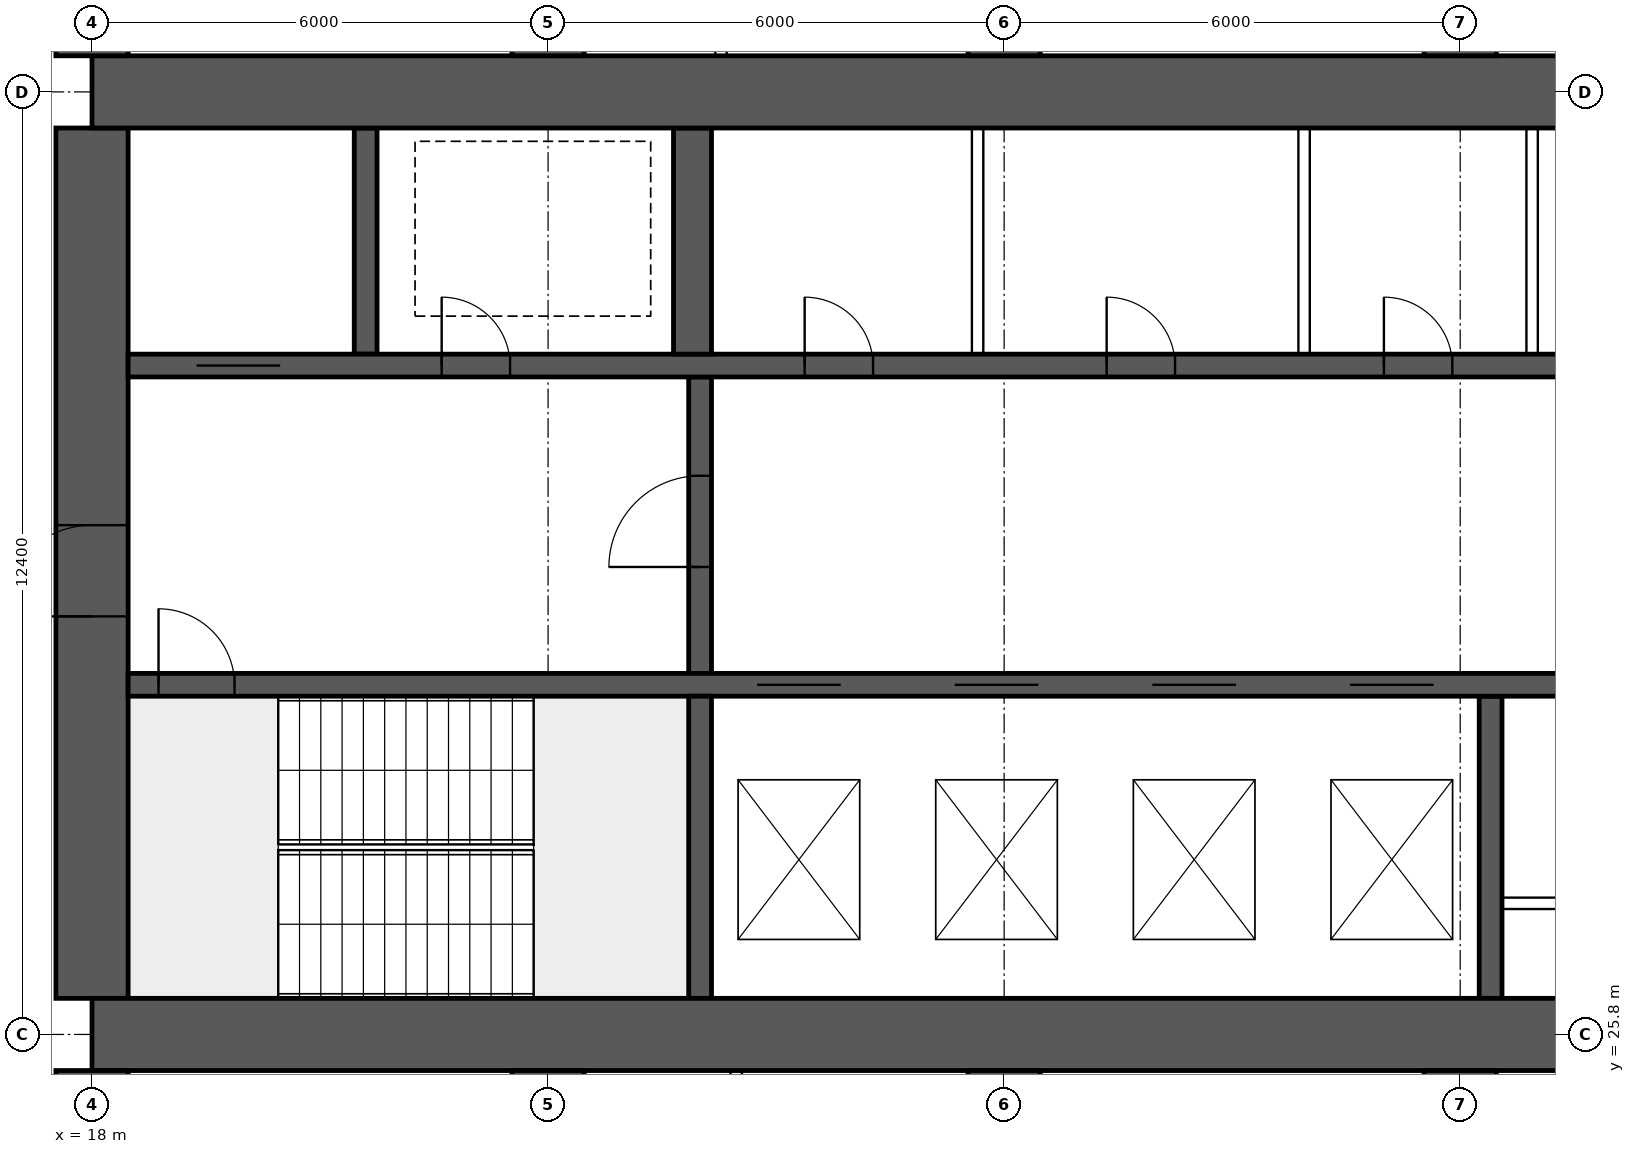
"""IFC4 building model, lengths in metres.
Left out: names, types, materials, properties, quantities, classifications, styles, units other than length and angle.
Written with IfcOpenShell. Run it as: python <this file> out.ifc"""

import sys

from ifc_helpers import new_model, si_unit, direction, frame, frame_2d, origin, place, context, subcontext, project, spatial, rectangle, extrude, element, fill, save


model = new_model("IFC4")
c1 = context("Model", 3, precision=1e-05, world=origin(), true_north=direction((0.0, 1.0)))
c2 = subcontext(c1, "Body", "Model", "MODEL_VIEW")
j1 = project(units=[si_unit("LENGTHUNIT", "METRE"), si_unit("PLANEANGLEUNIT", "RADIAN")], contexts=[c1])
p1 = place(None, origin())
s1 = spatial("IfcSite", under=j1, at=p1, CompositionType="ELEMENT")
p2 = place(p1, origin())
s2 = spatial("IfcBuilding", under=s1, at=p2, CompositionType="ELEMENT")
p3 = place(p2, frame((0.0, 0.0, 140.35)))
s3 = spatial("IfcBuildingStorey", under=s2, at=p3, CompositionType="ELEMENT", Elevation=140.35)
for number, where, z_axis, x_axis in (
    (1, (18.0, 25.8, 0.0), (0.0, 0.0, 1.0), (1.0, 0.0, 0.0)),
    (2, (18.0, 38.2, 0.0), (0.0, 0.0, 1.0), (1.0, 0.0, 0.0)),
):
    element("IfcWall", number, at=place(p3, frame(where, z_axis=z_axis, x_axis=x_axis)), inside=s3, PredefinedType="SHEAR", context=c2, shape_type="SweptSolid", body=[
        extrude(rectangle(XDim=48.0, YDim=0.95, at=frame_2d((24.0, 0.0))), origin(), (0.0, 0.0, 1.0), 4.5),
    ])
p4 = place(p3, frame((18.0, 26.275, 0.0), z_axis=(0.0, 0.0, 1.0), x_axis=(0.0, 1.0, 0.0)))
e3 = element("IfcWall", 3, at=p4, inside=s3, PredefinedType="SHEAR", context=c2, shape_type="SweptSolid", body=[
    extrude(rectangle(XDim=11.45, YDim=0.95, at=frame_2d((5.725, 0.0))), origin(), (0.0, 0.0, 1.0), 4.5),
])
p5 = place(p4, frame((5.025, 0.0, 0.0)))
e4 = element("IfcOpeningElement", 4, at=p5, cuts=e3, PredefinedType="OPENING", context=c2, shape_type="SweptSolid", body=[
    extrude(rectangle(XDim=1.2, YDim=2.1, at=frame_2d((0.6, 1.05))), frame((0.0, 0.485, 0.0), z_axis=(0.0, -1.0, 0.0), x_axis=(1.0, 0.0, 0.0)), (0.0, 0.0, 1.0), 0.97),
])
p6 = place(p3, frame((18.475, 30.4, 0.0), z_axis=(0.0, 0.0, 1.0), x_axis=(1.0, 0.0, 0.0)))
e5 = element("IfcWall", 5, at=p6, inside=s3, PredefinedType="SHEAR", context=c2, shape_type="SweptSolid", body=[
    extrude(rectangle(XDim=47.05, YDim=0.3, at=frame_2d((23.525, 0.0))), origin(), (0.0, 0.0, 1.0), 4.5),
])
p7 = place(p6, frame((0.4, 0.0, 0.0)))
e6 = element("IfcOpeningElement", 6, at=p7, cuts=e5, PredefinedType="OPENING", context=c2, shape_type="SweptSolid", body=[
    extrude(rectangle(XDim=1.0, YDim=2.1, at=frame_2d((0.5, 1.05))), frame((0.0, 0.16, 0.0), z_axis=(0.0, -1.0, 0.0), x_axis=(1.0, 0.0, 0.0)), (0.0, 0.0, 1.0), 0.32),
])
p8 = place(p6, frame((45.65, 0.0, 0.0)))
e7 = element("IfcOpeningElement", 7, at=p8, cuts=e5, PredefinedType="OPENING", context=c2, shape_type="SweptSolid", body=[
    extrude(rectangle(XDim=1.0, YDim=2.1, at=frame_2d((0.5, 1.05))), frame((0.0, 0.16, 0.0), z_axis=(0.0, -1.0, 0.0), x_axis=(1.0, 0.0, 0.0)), (0.0, 0.0, 1.0), 0.32),
])
p9 = place(p6, frame((8.275, 0.0, 0.0)))
e8 = element("IfcOpeningElement", 8, at=p9, cuts=e5, PredefinedType="OPENING", context=c2, shape_type="SweptSolid", body=[
    extrude(rectangle(XDim=1.1, YDim=2.1, at=frame_2d((0.55, 1.05))), frame((0.0, 0.16, 0.0), z_axis=(0.0, -1.0, 0.0), x_axis=(1.0, 0.0, 0.0)), (0.0, 0.0, 1.0), 0.32),
])
p10 = place(p6, frame((10.875, 0.0, 0.0)))
e9 = element("IfcOpeningElement", 9, at=p10, cuts=e5, PredefinedType="OPENING", context=c2, shape_type="SweptSolid", body=[
    extrude(rectangle(XDim=1.1, YDim=2.1, at=frame_2d((0.55, 1.05))), frame((0.0, 0.16, 0.0), z_axis=(0.0, -1.0, 0.0), x_axis=(1.0, 0.0, 0.0)), (0.0, 0.0, 1.0), 0.32),
])
p11 = place(p6, frame((13.475, 0.0, 0.0)))
e10 = element("IfcOpeningElement", 10, at=p11, cuts=e5, PredefinedType="OPENING", context=c2, shape_type="SweptSolid", body=[
    extrude(rectangle(XDim=1.1, YDim=2.1, at=frame_2d((0.55, 1.05))), frame((0.0, 0.16, 0.0), z_axis=(0.0, -1.0, 0.0), x_axis=(1.0, 0.0, 0.0)), (0.0, 0.0, 1.0), 0.32),
])
p12 = place(p6, frame((16.075, 0.0, 0.0)))
e11 = element("IfcOpeningElement", 11, at=p12, cuts=e5, PredefinedType="OPENING", context=c2, shape_type="SweptSolid", body=[
    extrude(rectangle(XDim=1.1, YDim=2.1, at=frame_2d((0.55, 1.05))), frame((0.0, 0.16, 0.0), z_axis=(0.0, -1.0, 0.0), x_axis=(1.0, 0.0, 0.0)), (0.0, 0.0, 1.0), 0.32),
])
p13 = place(p6, frame((18.85, 0.0, 0.0)))
e12 = element("IfcOpeningElement", 12, at=p13, cuts=e5, PredefinedType="OPENING", context=c2, shape_type="SweptSolid", body=[
    extrude(rectangle(XDim=0.9, YDim=2.1, at=frame_2d((0.45, 1.05))), frame((0.0, 0.16, 0.0), z_axis=(0.0, -1.0, 0.0), x_axis=(1.0, 0.0, 0.0)), (0.0, 0.0, 1.0), 0.32),
])
p14 = place(p6, frame((21.5, 0.0, 0.0)))
e13 = element("IfcOpeningElement", 13, at=p14, cuts=e5, PredefinedType="OPENING", context=c2, shape_type="SweptSolid", body=[
    extrude(rectangle(XDim=1.1, YDim=2.1, at=frame_2d((0.55, 1.05))), frame((0.0, 0.16, 0.0), z_axis=(0.0, -1.0, 0.0), x_axis=(1.0, 0.0, 0.0)), (0.0, 0.0, 1.0), 0.32),
])
p15 = place(p6, frame((30.142, 0.0, 0.0)))
e14 = element("IfcOpeningElement", 14, at=p15, cuts=e5, PredefinedType="OPENING", context=c2, shape_type="SweptSolid", body=[
    extrude(rectangle(XDim=1.1, YDim=2.1, at=frame_2d((0.55, 1.05))), frame((0.0, 0.16, 0.0), z_axis=(0.0, -1.0, 0.0), x_axis=(1.0, 0.0, 0.0)), (0.0, 0.0, 1.0), 0.32),
])
p16 = place(p6, frame((33.675, 0.0, 0.0)))
e15 = element("IfcOpeningElement", 15, at=p16, cuts=e5, PredefinedType="OPENING", context=c2, shape_type="SweptSolid", body=[
    extrude(rectangle(XDim=1.1, YDim=2.1, at=frame_2d((0.55, 1.05))), frame((0.0, 0.16, 0.0), z_axis=(0.0, -1.0, 0.0), x_axis=(1.0, 0.0, 0.0)), (0.0, 0.0, 1.0), 0.32),
])
p17 = place(p6, frame((37.208, 0.0, 0.0)))
e16 = element("IfcOpeningElement", 16, at=p17, cuts=e5, PredefinedType="OPENING", context=c2, shape_type="SweptSolid", body=[
    extrude(rectangle(XDim=1.1, YDim=2.1, at=frame_2d((0.55, 1.05))), frame((0.0, 0.16, 0.0), z_axis=(0.0, -1.0, 0.0), x_axis=(1.0, 0.0, 0.0)), (0.0, 0.0, 1.0), 0.32),
])
p18 = place(p3, frame((18.475, 34.6, 0.0), z_axis=(0.0, 0.0, 1.0), x_axis=(1.0, 0.0, 0.0)))
e17 = element("IfcWall", 17, at=p18, inside=s3, PredefinedType="SHEAR", context=c2, shape_type="SweptSolid", body=[
    extrude(rectangle(XDim=47.05, YDim=0.3, at=frame_2d((23.525, 0.0))), origin(), (0.0, 0.0, 1.0), 4.5),
])
p19 = place(p18, frame((0.9, 0.0, 0.0)))
e18 = element("IfcOpeningElement", 18, at=p19, cuts=e17, PredefinedType="OPENING", context=c2, shape_type="SweptSolid", body=[
    extrude(rectangle(XDim=1.1, YDim=2.1, at=frame_2d((0.55, 1.05))), frame((0.0, 0.16, 0.0), z_axis=(0.0, -1.0, 0.0), x_axis=(1.0, 0.0, 0.0)), (0.0, 0.0, 1.0), 0.32),
])
p20 = place(p18, frame((45.05, 0.0, 0.0)))
e19 = element("IfcOpeningElement", 19, at=p20, cuts=e17, PredefinedType="OPENING", context=c2, shape_type="SweptSolid", body=[
    extrude(rectangle(XDim=1.1, YDim=2.1, at=frame_2d((0.55, 1.05))), frame((0.0, 0.16, 0.0), z_axis=(0.0, -1.0, 0.0), x_axis=(1.0, 0.0, 0.0)), (0.0, 0.0, 1.0), 0.32),
])
p21 = place(p18, frame((4.125, 0.0, 0.0)))
e20 = element("IfcOpeningElement", 20, at=p21, cuts=e17, PredefinedType="OPENING", context=c2, shape_type="SweptSolid", body=[
    extrude(rectangle(XDim=0.9, YDim=2.1, at=frame_2d((0.45, 1.05))), frame((0.0, 0.16, 0.0), z_axis=(0.0, -1.0, 0.0), x_axis=(1.0, 0.0, 0.0)), (0.0, 0.0, 1.0), 0.32),
])
p22 = place(p18, frame((42.025, 0.0, 0.0)))
e21 = element("IfcOpeningElement", 21, at=p22, cuts=e17, PredefinedType="OPENING", context=c2, shape_type="SweptSolid", body=[
    extrude(rectangle(XDim=0.9, YDim=2.1, at=frame_2d((0.45, 1.05))), frame((0.0, 0.16, 0.0), z_axis=(0.0, -1.0, 0.0), x_axis=(1.0, 0.0, 0.0)), (0.0, 0.0, 1.0), 0.32),
])
p23 = place(p18, frame((8.9, 0.0, 0.0)))
e22 = element("IfcOpeningElement", 22, at=p23, cuts=e17, PredefinedType="OPENING", context=c2, shape_type="SweptSolid", body=[
    extrude(rectangle(XDim=0.9, YDim=2.1, at=frame_2d((0.45, 1.05))), frame((0.0, 0.16, 0.0), z_axis=(0.0, -1.0, 0.0), x_axis=(1.0, 0.0, 0.0)), (0.0, 0.0, 1.0), 0.32),
])
p24 = place(p18, frame((12.874, 0.0, 0.0)))
e23 = element("IfcOpeningElement", 23, at=p24, cuts=e17, PredefinedType="OPENING", context=c2, shape_type="SweptSolid", body=[
    extrude(rectangle(XDim=0.9, YDim=2.1, at=frame_2d((0.45, 1.05))), frame((0.0, 0.16, 0.0), z_axis=(0.0, -1.0, 0.0), x_axis=(1.0, 0.0, 0.0)), (0.0, 0.0, 1.0), 0.32),
])
p25 = place(p18, frame((16.521, 0.0, 0.0)))
e24 = element("IfcOpeningElement", 24, at=p25, cuts=e17, PredefinedType="OPENING", context=c2, shape_type="SweptSolid", body=[
    extrude(rectangle(XDim=0.9, YDim=2.1, at=frame_2d((0.45, 1.05))), frame((0.0, 0.16, 0.0), z_axis=(0.0, -1.0, 0.0), x_axis=(1.0, 0.0, 0.0)), (0.0, 0.0, 1.0), 0.32),
])
p26 = place(p18, frame((20.28, 0.0, 0.0)))
e25 = element("IfcOpeningElement", 25, at=p26, cuts=e17, PredefinedType="OPENING", context=c2, shape_type="SweptSolid", body=[
    extrude(rectangle(XDim=0.9, YDim=2.1, at=frame_2d((0.45, 1.05))), frame((0.0, 0.16, 0.0), z_axis=(0.0, -1.0, 0.0), x_axis=(1.0, 0.0, 0.0)), (0.0, 0.0, 1.0), 0.32),
])
p27 = place(p18, frame((24.686, 0.0, 0.0)))
e26 = element("IfcOpeningElement", 26, at=p27, cuts=e17, PredefinedType="OPENING", context=c2, shape_type="SweptSolid", body=[
    extrude(rectangle(XDim=0.9, YDim=2.1, at=frame_2d((0.45, 1.05))), frame((0.0, 0.16, 0.0), z_axis=(0.0, -1.0, 0.0), x_axis=(1.0, 0.0, 0.0)), (0.0, 0.0, 1.0), 0.32),
])
p28 = place(p18, frame((27.483, 0.0, 0.0)))
e27 = element("IfcOpeningElement", 27, at=p28, cuts=e17, PredefinedType="OPENING", context=c2, shape_type="SweptSolid", body=[
    extrude(rectangle(XDim=0.9, YDim=2.1, at=frame_2d((0.45, 1.05))), frame((0.0, 0.16, 0.0), z_axis=(0.0, -1.0, 0.0), x_axis=(1.0, 0.0, 0.0)), (0.0, 0.0, 1.0), 0.32),
])
p29 = place(p18, frame((30.666, 0.0, 0.0)))
e28 = element("IfcOpeningElement", 28, at=p29, cuts=e17, PredefinedType="OPENING", context=c2, shape_type="SweptSolid", body=[
    extrude(rectangle(XDim=0.9, YDim=2.1, at=frame_2d((0.45, 1.05))), frame((0.0, 0.16, 0.0), z_axis=(0.0, -1.0, 0.0), x_axis=(1.0, 0.0, 0.0)), (0.0, 0.0, 1.0), 0.32),
])
p30 = place(p18, frame((34.617, 0.0, 0.0)))
e29 = element("IfcOpeningElement", 29, at=p30, cuts=e17, PredefinedType="OPENING", context=c2, shape_type="SweptSolid", body=[
    extrude(rectangle(XDim=0.9, YDim=2.1, at=frame_2d((0.45, 1.05))), frame((0.0, 0.16, 0.0), z_axis=(0.0, -1.0, 0.0), x_axis=(1.0, 0.0, 0.0)), (0.0, 0.0, 1.0), 0.32),
])
p31 = place(p18, frame((37.555, 0.0, 0.0)))
e30 = element("IfcOpeningElement", 30, at=p31, cuts=e17, PredefinedType="OPENING", context=c2, shape_type="SweptSolid", body=[
    extrude(rectangle(XDim=0.9, YDim=2.1, at=frame_2d((0.45, 1.05))), frame((0.0, 0.16, 0.0), z_axis=(0.0, -1.0, 0.0), x_axis=(1.0, 0.0, 0.0)), (0.0, 0.0, 1.0), 0.32),
])
p32 = place(p3, frame((26.0, 26.275, 0.0), z_axis=(0.0, 0.0, 1.0), x_axis=(0.0, 1.0, 0.0)))
e31 = element("IfcWall", 31, at=p32, inside=s3, PredefinedType="SHEAR", context=c2, shape_type="SweptSolid", body=[
    extrude(rectangle(XDim=3.975, YDim=0.3, at=frame_2d((1.988, 0.0))), origin(), (0.0, 0.0, 1.0), 4.5),
])
p33 = place(p3, frame((26.0, 30.55, 0.0), z_axis=(0.0, 0.0, 1.0), x_axis=(0.0, 1.0, 0.0)))
e32 = element("IfcWall", 32, at=p33, inside=s3, PredefinedType="SHEAR", context=c2, shape_type="SweptSolid", body=[
    extrude(rectangle(XDim=3.9, YDim=0.3, at=frame_2d((1.95, 0.0))), origin(), (0.0, 0.0, 1.0), 4.5),
])
p34 = place(p33, frame((1.4, 0.0, 0.0)))
e33 = element("IfcOpeningElement", 33, at=p34, cuts=e32, PredefinedType="OPENING", context=c2, shape_type="SweptSolid", body=[
    extrude(rectangle(XDim=1.2, YDim=2.1, at=frame_2d((0.6, 1.05))), frame((0.0, 0.16, 0.0), z_axis=(0.0, -1.0, 0.0), x_axis=(1.0, 0.0, 0.0)), (0.0, 0.0, 1.0), 0.32),
])
p35 = place(p3, frame((21.6, 34.75, 0.0), z_axis=(0.0, 0.0, 1.0), x_axis=(0.0, 1.0, 0.0)))
e34 = element("IfcWall", 34, at=p35, inside=s3, PredefinedType="SHEAR", context=c2, shape_type="SweptSolid", body=[
    extrude(rectangle(XDim=2.975, YDim=0.3, at=frame_2d((1.488, 0.0))), origin(), (0.0, 0.0, 1.0), 4.5),
])
p36 = place(p3, frame((25.9, 34.75, 0.0), z_axis=(0.0, 0.0, 1.0), x_axis=(0.0, 1.0, 0.0)))
e35 = element("IfcWall", 35, at=p36, inside=s3, PredefinedType="SHEAR", context=c2, shape_type="SweptSolid", body=[
    extrude(rectangle(XDim=2.975, YDim=0.5, at=frame_2d((1.488, 0.0))), origin(), (0.0, 0.0, 1.0), 4.5),
])
p37 = place(p3, frame((36.4, 26.275, 0.0), z_axis=(0.0, 0.0, 1.0), x_axis=(0.0, 1.0, 0.0)))
e36 = element("IfcWall", 36, at=p37, inside=s3, PredefinedType="SHEAR", context=c2, shape_type="SweptSolid", body=[
    extrude(rectangle(XDim=3.975, YDim=0.3, at=frame_2d((1.988, 0.0))), origin(), (0.0, 0.0, 1.0), 4.5),
])
for number, where, z_axis, x_axis in (
    (37, (18.0, 17.2, 0.0), (0.0, 0.0, 1.0), (0.0, 1.0, 0.0)),
    (38, (18.0, 38.675, 0.0), (0.0, 0.0, 1.0), (0.0, 1.0, 0.0)),
    (39, (24.0, 17.2, 0.0), (0.0, 0.0, 1.0), (0.0, 1.0, 0.0)),
    (40, (24.0, 38.675, 0.0), (0.0, 0.0, 1.0), (0.0, 1.0, 0.0)),
    (41, (30.0, 17.2, 0.0), (0.0, 0.0, 1.0), (0.0, 1.0, 0.0)),
    (42, (30.0, 38.675, 0.0), (0.0, 0.0, 1.0), (0.0, 1.0, 0.0)),
    (43, (36.0, 17.2, 0.0), (0.0, 0.0, 1.0), (0.0, 1.0, 0.0)),
    (44, (36.0, 38.675, 0.0), (0.0, 0.0, 1.0), (0.0, 1.0, 0.0)),
):
    element("IfcWall", number, at=place(p3, frame(where, z_axis=z_axis, x_axis=x_axis)), inside=s3, PredefinedType="SHEAR", context=c2, shape_type="SweptSolid", body=[
        extrude(rectangle(XDim=8.125, YDim=0.95, at=frame_2d((4.062, 0.0))), origin(), (0.0, 0.0, 1.0), 4.5),
    ])
for number, where, z_axis, x_axis in (
    (45, (29.651, 34.75, 0.0), (0.0, 0.0, 1.0), (0.0, 1.0, 0.0)),
    (46, (33.946, 34.75, 0.0), (0.0, 0.0, 1.0), (0.0, 1.0, 0.0)),
    (47, (36.946, 34.75, 0.0), (0.0, 0.0, 1.0), (0.0, 1.0, 0.0)),
):
    element("IfcWall", number, at=place(p3, frame(where, z_axis=z_axis, x_axis=x_axis)), inside=s3, PredefinedType="SOLIDWALL", context=c2, shape_type="SweptSolid", body=[
        extrude(rectangle(XDim=2.975, YDim=0.15, at=frame_2d((1.488, 0.0))), origin(), (0.0, 0.0, 1.0), 4.25),
    ])
p38 = place(p3, frame((36.55, 27.525, 0.0), z_axis=(0.0, 0.0, 1.0), x_axis=(1.0, 0.0, 0.0)))
e48 = element("IfcWall", 48, at=p38, inside=s3, PredefinedType="SOLIDWALL", context=c2, shape_type="SweptSolid", body=[
    extrude(rectangle(XDim=2.5, YDim=0.15, at=frame_2d((1.25, 0.0))), origin(), (0.0, 0.0, 1.0), 4.25),
])
p39 = place(p38, frame((0.8, 0.0, 0.0)))
e49 = element("IfcOpeningElement", 49, at=p39, cuts=e48, PredefinedType="OPENING", context=c2, shape_type="SweptSolid", body=[
    extrude(rectangle(XDim=0.9, YDim=2.1, at=frame_2d((0.45, 1.05))), frame((0.0, 0.085, 0.0), z_axis=(0.0, -1.0, 0.0), x_axis=(1.0, 0.0, 0.0)), (0.0, 0.0, 1.0), 0.17),
])
for number, where, z_axis, x_axis in (
    (50, (26.475, 17.3, 0.0), (0.0, 0.0, 1.0), (0.0, 1.0, 0.0)),
    (51, (26.275, 38.675, 0.0), (0.0, 0.0, 1.0), (0.0, 1.0, 0.0)),
):
    element("IfcWall", number, at=place(p3, frame(where, z_axis=z_axis, x_axis=x_axis)), inside=s3, PredefinedType="PARTITIONING", context=c2, shape_type="SweptSolid", body=[
        extrude(rectangle(XDim=8.025, YDim=0.15, at=frame_2d((4.012, 0.0))), origin(), (0.0, 0.0, 1.0), 4.25),
    ])
p40 = place(p5, origin())
e52 = element("IfcDoor", 52, at=p40, inside=s3, OperationType="SINGLE_SWING_LEFT", PredefinedType="DOOR", context=c2, shape_type="SweptSolid", body=[
    extrude(rectangle(XDim=1.2, YDim=2.1, at=frame_2d((0.6, 1.05))), frame((0.0, 0.025, 0.0), z_axis=(0.0, -1.0, 0.0), x_axis=(1.0, 0.0, 0.0)), (0.0, 0.0, 1.0), 0.05),
])
fill(e4, e52)
p41 = place(p7, origin())
e53 = element("IfcDoor", 53, at=p41, inside=s3, OperationType="SINGLE_SWING_LEFT", PredefinedType="DOOR", context=c2, shape_type="SweptSolid", body=[
    extrude(rectangle(XDim=1.0, YDim=2.1, at=frame_2d((0.5, 1.05))), frame((0.0, 0.025, 0.0), z_axis=(0.0, -1.0, 0.0), x_axis=(1.0, 0.0, 0.0)), (0.0, 0.0, 1.0), 0.05),
])
fill(e6, e53)
p42 = place(p19, origin())
e54 = element("IfcDoor", 54, at=p42, inside=s3, OperationType="DOUBLE_DOOR_SLIDING", PredefinedType="DOOR", context=c2, shape_type="SweptSolid", body=[
    extrude(rectangle(XDim=1.1, YDim=2.1, at=frame_2d((0.55, 1.05))), frame((0.0, 0.025, 0.0), z_axis=(0.0, -1.0, 0.0), x_axis=(1.0, 0.0, 0.0)), (0.0, 0.0, 1.0), 0.05),
])
fill(e18, e54)
p43 = place(p21, origin())
e55 = element("IfcDoor", 55, at=p43, inside=s3, OperationType="SINGLE_SWING_LEFT", PredefinedType="DOOR", context=c2, shape_type="SweptSolid", body=[
    extrude(rectangle(XDim=0.9, YDim=2.1, at=frame_2d((0.45, 1.05))), frame((0.0, 0.025, 0.0), z_axis=(0.0, -1.0, 0.0), x_axis=(1.0, 0.0, 0.0)), (0.0, 0.0, 1.0), 0.05),
])
fill(e20, e55)
p44 = place(p34, origin())
e56 = element("IfcDoor", 56, at=p44, inside=s3, OperationType="SINGLE_SWING_LEFT", PredefinedType="DOOR", context=c2, shape_type="SweptSolid", body=[
    extrude(rectangle(XDim=1.2, YDim=2.1, at=frame_2d((0.6, 1.05))), frame((0.0, 0.025, 0.0), z_axis=(0.0, -1.0, 0.0), x_axis=(1.0, 0.0, 0.0)), (0.0, 0.0, 1.0), 0.05),
])
fill(e33, e56)
p45 = place(p23, origin())
e57 = element("IfcDoor", 57, at=p45, inside=s3, OperationType="SINGLE_SWING_LEFT", PredefinedType="DOOR", context=c2, shape_type="SweptSolid", body=[
    extrude(rectangle(XDim=0.9, YDim=2.1, at=frame_2d((0.45, 1.05))), frame((0.0, 0.025, 0.0), z_axis=(0.0, -1.0, 0.0), x_axis=(1.0, 0.0, 0.0)), (0.0, 0.0, 1.0), 0.05),
])
fill(e22, e57)
p46 = place(p24, origin())
e58 = element("IfcDoor", 58, at=p46, inside=s3, OperationType="SINGLE_SWING_LEFT", PredefinedType="DOOR", context=c2, shape_type="SweptSolid", body=[
    extrude(rectangle(XDim=0.9, YDim=2.1, at=frame_2d((0.45, 1.05))), frame((0.0, 0.025, 0.0), z_axis=(0.0, -1.0, 0.0), x_axis=(1.0, 0.0, 0.0)), (0.0, 0.0, 1.0), 0.05),
])
fill(e23, e58)
p47 = place(p25, origin())
e59 = element("IfcDoor", 59, at=p47, inside=s3, OperationType="SINGLE_SWING_LEFT", PredefinedType="DOOR", context=c2, shape_type="SweptSolid", body=[
    extrude(rectangle(XDim=0.9, YDim=2.1, at=frame_2d((0.45, 1.05))), frame((0.0, 0.025, 0.0), z_axis=(0.0, -1.0, 0.0), x_axis=(1.0, 0.0, 0.0)), (0.0, 0.0, 1.0), 0.05),
])
fill(e24, e59)
p48 = place(p9, origin())
e60 = element("IfcDoor", 60, at=p48, inside=s3, OperationType="DOUBLE_DOOR_SLIDING", PredefinedType="DOOR", context=c2, shape_type="SweptSolid", body=[
    extrude(rectangle(XDim=1.1, YDim=2.1, at=frame_2d((0.55, 1.05))), frame((0.0, 0.025, 0.0), z_axis=(0.0, -1.0, 0.0), x_axis=(1.0, 0.0, 0.0)), (0.0, 0.0, 1.0), 0.05),
])
fill(e8, e60)
p49 = place(p10, origin())
e61 = element("IfcDoor", 61, at=p49, inside=s3, OperationType="DOUBLE_DOOR_SLIDING", PredefinedType="DOOR", context=c2, shape_type="SweptSolid", body=[
    extrude(rectangle(XDim=1.1, YDim=2.1, at=frame_2d((0.55, 1.05))), frame((0.0, 0.025, 0.0), z_axis=(0.0, -1.0, 0.0), x_axis=(1.0, 0.0, 0.0)), (0.0, 0.0, 1.0), 0.05),
])
fill(e9, e61)
p50 = place(p11, origin())
e62 = element("IfcDoor", 62, at=p50, inside=s3, OperationType="DOUBLE_DOOR_SLIDING", PredefinedType="DOOR", context=c2, shape_type="SweptSolid", body=[
    extrude(rectangle(XDim=1.1, YDim=2.1, at=frame_2d((0.55, 1.05))), frame((0.0, 0.025, 0.0), z_axis=(0.0, -1.0, 0.0), x_axis=(1.0, 0.0, 0.0)), (0.0, 0.0, 1.0), 0.05),
])
fill(e10, e62)
p51 = place(p12, origin())
e63 = element("IfcDoor", 63, at=p51, inside=s3, OperationType="DOUBLE_DOOR_SLIDING", PredefinedType="DOOR", context=c2, shape_type="SweptSolid", body=[
    extrude(rectangle(XDim=1.1, YDim=2.1, at=frame_2d((0.55, 1.05))), frame((0.0, 0.025, 0.0), z_axis=(0.0, -1.0, 0.0), x_axis=(1.0, 0.0, 0.0)), (0.0, 0.0, 1.0), 0.05),
])
fill(e11, e63)
save(model, sys.argv[1])
